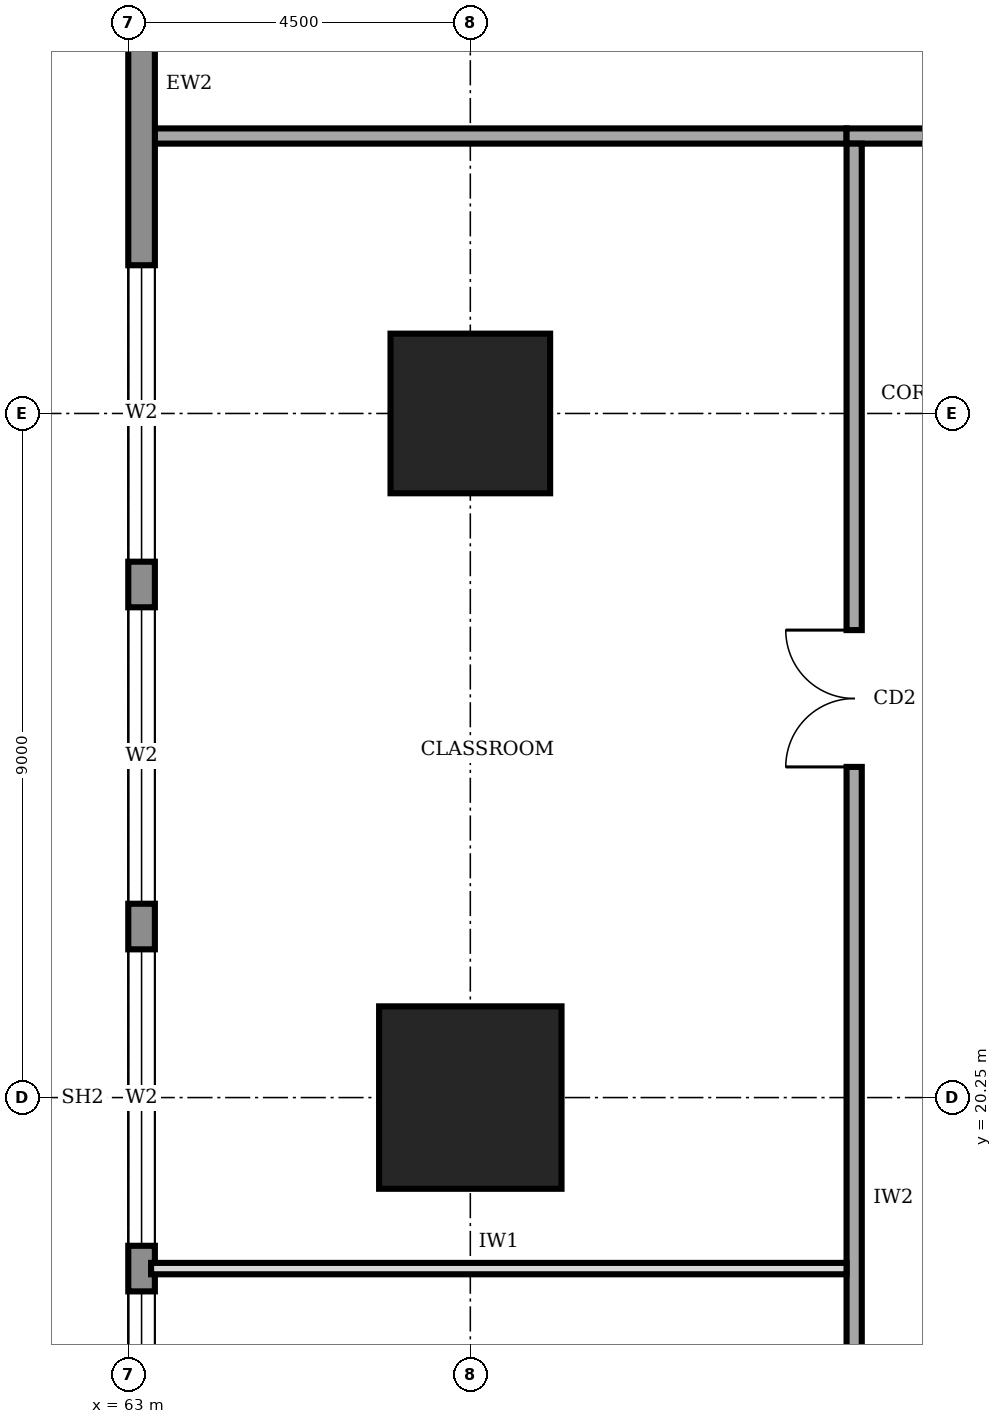
"""IFC4 building model, lengths in metres.
Left out: names, types, materials, properties, quantities, classifications, styles, units other than length and angle.
Written with IfcOpenShell. Run it as: python <this file> out.ifc"""

import sys

from ifc_helpers import new_model, si_unit, direction, frame, frame_2d, origin, origin_2d, place, context, subcontext, project, spatial, rectangle, extrude, element, fill, save


model = new_model("IFC4")
c1 = context("Model", 3, precision=1e-05, world=origin(), true_north=direction((0.0, 1.0)))
c2 = subcontext(c1, "Body", "Model", "MODEL_VIEW")
j1 = project(units=[si_unit("LENGTHUNIT", "METRE"), si_unit("PLANEANGLEUNIT", "RADIAN")], contexts=[c1])
p1 = place(None, origin())
s1 = spatial("IfcSite", under=j1, at=p1, CompositionType="ELEMENT")
p2 = place(p1, origin())
s2 = spatial("IfcBuilding", under=s1, at=p2, CompositionType="ELEMENT")
p3 = place(p2, frame((0.0, 0.0, 65.0)))
s3 = spatial("IfcBuildingStorey", under=s2, at=p3, CompositionType="ELEMENT", Elevation=65.0)
p4 = place(p3, frame((67.5, 20.25, 0.0), z_axis=(0.0, 0.0, 1.0), x_axis=(1.0, 0.0, 0.0)))
e1 = element("IfcColumn", 1, at=p4, inside=s3, PredefinedType="COLUMN", context=c2, shape_type="SweptSolid", body=[
    extrude(rectangle(XDim=2.4, YDim=2.4, at=origin_2d()), origin(), (0.0, 0.0, 1.0), 4.0),
])
p5 = place(p3, frame((67.5, 29.25, 0.0), z_axis=(0.0, 0.0, 1.0), x_axis=(1.0, 0.0, 0.0)))
e2 = element("IfcColumn", 2, at=p5, inside=s3, PredefinedType="COLUMN", context=c2, shape_type="SweptSolid", body=[
    extrude(rectangle(XDim=2.1, YDim=2.1, at=origin_2d()), origin(), (0.0, 0.0, 1.0), 4.0),
])
p6 = place(p3, frame((63.175, 35.98, 0.0), z_axis=(0.0, 0.0, 1.0), x_axis=(0.0, -1.0, 0.0)))
e3 = element("IfcWall", 3, at=p6, inside=s3, PredefinedType="STANDARD", context=c2, shape_type="SweptSolid", body=[
    extrude(rectangle(XDim=31.46, YDim=0.35, at=frame_2d((15.73, 0.0))), origin(), (0.0, 0.0, 1.0), 3.75),
])
p7 = place(p6, frame((27.21, 0.0, 0.6)))
e4 = element("IfcOpeningElement", 4, at=p7, cuts=e3, PredefinedType="OPENING", context=c2, shape_type="SweptSolid", body=[
    extrude(rectangle(XDim=3.9, YDim=2.6, at=frame_2d((1.95, 1.3))), frame((0.0, 0.185, 0.0), z_axis=(0.0, -1.0, 0.0), x_axis=(1.0, 0.0, 0.0)), (0.0, 0.0, 1.0), 0.37),
])
p8 = place(p6, frame((22.78, 0.0, 0.6)))
e5 = element("IfcOpeningElement", 5, at=p8, cuts=e3, PredefinedType="OPENING", context=c2, shape_type="SweptSolid", body=[
    extrude(rectangle(XDim=3.9, YDim=2.6, at=frame_2d((1.95, 1.3))), frame((0.0, 0.185, 0.0), z_axis=(0.0, -1.0, 0.0), x_axis=(1.0, 0.0, 0.0)), (0.0, 0.0, 1.0), 0.37),
])
p9 = place(p6, frame((18.28, 0.0, 0.6)))
e6 = element("IfcOpeningElement", 6, at=p9, cuts=e3, PredefinedType="OPENING", context=c2, shape_type="SweptSolid", body=[
    extrude(rectangle(XDim=3.9, YDim=2.6, at=frame_2d((1.95, 1.3))), frame((0.0, 0.185, 0.0), z_axis=(0.0, -1.0, 0.0), x_axis=(1.0, 0.0, 0.0)), (0.0, 0.0, 1.0), 0.37),
])
p10 = place(p6, frame((13.78, 0.0, 0.6)))
e7 = element("IfcOpeningElement", 7, at=p10, cuts=e3, PredefinedType="OPENING", context=c2, shape_type="SweptSolid", body=[
    extrude(rectangle(XDim=3.9, YDim=2.6, at=frame_2d((1.95, 1.3))), frame((0.0, 0.185, 0.0), z_axis=(0.0, -1.0, 0.0), x_axis=(1.0, 0.0, 0.0)), (0.0, 0.0, 1.0), 0.37),
])
p11 = place(p6, frame((9.28, 0.0, 0.6)))
e8 = element("IfcOpeningElement", 8, at=p11, cuts=e3, PredefinedType="OPENING", context=c2, shape_type="SweptSolid", body=[
    extrude(rectangle(XDim=3.9, YDim=2.6, at=frame_2d((1.95, 1.3))), frame((0.0, 0.185, 0.0), z_axis=(0.0, -1.0, 0.0), x_axis=(1.0, 0.0, 0.0)), (0.0, 0.0, 1.0), 0.37),
])
p12 = place(p6, frame((4.78, 0.0, 0.6)))
e9 = element("IfcOpeningElement", 9, at=p12, cuts=e3, PredefinedType="OPENING", context=c2, shape_type="SweptSolid", body=[
    extrude(rectangle(XDim=3.9, YDim=2.6, at=frame_2d((1.95, 1.3))), frame((0.0, 0.185, 0.0), z_axis=(0.0, -1.0, 0.0), x_axis=(1.0, 0.0, 0.0)), (0.0, 0.0, 1.0), 0.37),
])
p13 = place(p3, frame((89.35, 32.9, 0.0), z_axis=(0.0, 0.0, 1.0), x_axis=(-1.0, 0.0, 0.0)))
e10 = element("IfcWall", 10, at=p13, inside=s3, PredefinedType="SOLIDWALL", context=c2, shape_type="SweptSolid", body=[
    extrude(rectangle(XDim=16.9, YDim=0.2, at=frame_2d((8.45, 0.0))), origin(), (0.0, 0.0, 1.0), 3.75),
])
p14 = place(p13, frame((14.375, 0.0, 0.0)))
e11 = element("IfcOpeningElement", 11, at=p14, cuts=e10, PredefinedType="OPENING", context=c2, shape_type="SweptSolid", body=[
    extrude(rectangle(XDim=1.0, YDim=2.1, at=frame_2d((0.5, 1.05))), frame((0.0, 0.11, 0.0), z_axis=(0.0, -1.0, 0.0), x_axis=(1.0, 0.0, 0.0)), (0.0, 0.0, 1.0), 0.22),
])
p15 = place(p13, frame((7.85, 0.0, 0.0)))
e12 = element("IfcOpeningElement", 12, at=p15, cuts=e10, PredefinedType="OPENING", context=c2, shape_type="SweptSolid", body=[
    extrude(rectangle(XDim=1.0, YDim=2.1, at=frame_2d((0.5, 1.05))), frame((0.0, 0.11, 0.0), z_axis=(0.0, -1.0, 0.0), x_axis=(1.0, 0.0, 0.0)), (0.0, 0.0, 1.0), 0.22),
])
p16 = place(p13, frame((1.325, 0.0, 0.0)))
e13 = element("IfcOpeningElement", 13, at=p16, cuts=e10, PredefinedType="OPENING", context=c2, shape_type="SweptSolid", body=[
    extrude(rectangle(XDim=1.0, YDim=2.1, at=frame_2d((0.5, 1.05))), frame((0.0, 0.11, 0.0), z_axis=(0.0, -1.0, 0.0), x_axis=(1.0, 0.0, 0.0)), (0.0, 0.0, 1.0), 0.22),
])
p17 = place(p3, frame((72.55, 32.8, 0.0), z_axis=(0.0, 0.0, 1.0), x_axis=(0.0, -1.0, 0.0)))
e14 = element("IfcWall", 14, at=p17, inside=s3, PredefinedType="SOLIDWALL", context=c2, shape_type="SweptSolid", body=[
    extrude(rectangle(XDim=25.3, YDim=0.2, at=frame_2d((12.65, 0.0))), origin(), (0.0, 0.0, 1.0), 3.75),
])
p18 = place(p17, frame((19.55, 0.0, 0.0)))
e15 = element("IfcOpeningElement", 15, at=p18, cuts=e14, PredefinedType="OPENING", context=c2, shape_type="SweptSolid", body=[
    extrude(rectangle(XDim=1.0, YDim=2.1, at=frame_2d((0.5, 1.05))), frame((0.0, 0.11, 0.0), z_axis=(0.0, -1.0, 0.0), x_axis=(1.0, 0.0, 0.0)), (0.0, 0.0, 1.0), 0.22),
])
p19 = place(p17, frame((6.4, 0.0, 0.0)))
e16 = element("IfcOpeningElement", 16, at=p19, cuts=e14, PredefinedType="OPENING", context=c2, shape_type="SweptSolid", body=[
    extrude(rectangle(XDim=1.8, YDim=2.1, at=frame_2d((0.9, 1.05))), frame((0.0, 0.11, 0.0), z_axis=(0.0, -1.0, 0.0), x_axis=(1.0, 0.0, 0.0)), (0.0, 0.0, 1.0), 0.22),
])
p20 = place(p3, frame((63.3, 32.9, 0.0), z_axis=(0.0, 0.0, 1.0), x_axis=(1.0, 0.0, 0.0)))
e17 = element("IfcWall", 17, at=p20, inside=s3, PredefinedType="SOLIDWALL", context=c2, shape_type="SweptSolid", body=[
    extrude(rectangle(XDim=9.15, YDim=0.2, at=frame_2d((4.575, 0.0))), origin(), (0.0, 0.0, 1.0), 3.75),
])
p21 = place(p3, frame((63.3, 18.0, 0.0), z_axis=(0.0, 0.0, 1.0), x_axis=(1.0, 0.0, 0.0)))
e18 = element("IfcWall", 18, at=p21, inside=s3, PredefinedType="PARTITIONING", context=c2, shape_type="SweptSolid", body=[
    extrude(rectangle(XDim=9.15, YDim=0.15, at=frame_2d((4.575, 0.0))), origin(), (0.0, 0.0, 1.0), 3.75),
])
p22 = place(p9, origin())
e19 = element("IfcWindow", 19, at=p22, inside=s3, PartitioningType="SINGLE_PANEL", PredefinedType="WINDOW", context=c2, shape_type="SweptSolid", body=[
    extrude(rectangle(XDim=3.9, YDim=2.6, at=frame_2d((1.95, 1.3))), frame((0.0, 0.03, 0.0), z_axis=(0.0, -1.0, 0.0), x_axis=(1.0, 0.0, 0.0)), (0.0, 0.0, 1.0), 0.06),
])
fill(e6, e19)
p23 = place(p10, origin())
e20 = element("IfcWindow", 20, at=p23, inside=s3, PartitioningType="SINGLE_PANEL", PredefinedType="WINDOW", context=c2, shape_type="SweptSolid", body=[
    extrude(rectangle(XDim=3.9, YDim=2.6, at=frame_2d((1.95, 1.3))), frame((0.0, 0.03, 0.0), z_axis=(0.0, -1.0, 0.0), x_axis=(1.0, 0.0, 0.0)), (0.0, 0.0, 1.0), 0.06),
])
fill(e7, e20)
p24 = place(p11, origin())
e21 = element("IfcWindow", 21, at=p24, inside=s3, PartitioningType="SINGLE_PANEL", PredefinedType="WINDOW", context=c2, shape_type="SweptSolid", body=[
    extrude(rectangle(XDim=3.9, YDim=2.6, at=frame_2d((1.95, 1.3))), frame((0.0, 0.03, 0.0), z_axis=(0.0, -1.0, 0.0), x_axis=(1.0, 0.0, 0.0)), (0.0, 0.0, 1.0), 0.06),
])
fill(e8, e21)
p25 = place(p12, origin())
e22 = element("IfcWindow", 22, at=p25, inside=s3, PartitioningType="SINGLE_PANEL", PredefinedType="WINDOW", context=c2, shape_type="SweptSolid", body=[
    extrude(rectangle(XDim=3.9, YDim=2.6, at=frame_2d((1.95, 1.3))), frame((0.0, 0.03, 0.0), z_axis=(0.0, -1.0, 0.0), x_axis=(1.0, 0.0, 0.0)), (0.0, 0.0, 1.0), 0.06),
])
fill(e9, e22)
p26 = place(p19, frame((1.8, 0.0, 0.0), z_axis=(0.0, 0.0, 1.0), x_axis=(-1.0, 0.0, 0.0)))
e23 = element("IfcDoor", 23, at=p26, inside=s3, OperationType="DOUBLE_DOOR_SINGLE_SWING", PredefinedType="DOOR", context=c2, shape_type="SweptSolid", body=[
    extrude(rectangle(XDim=1.8, YDim=2.1, at=frame_2d((0.9, 1.05))), frame((0.0, 0.025, 0.0), z_axis=(0.0, -1.0, 0.0), x_axis=(1.0, 0.0, 0.0)), (0.0, 0.0, 1.0), 0.05),
])
fill(e16, e23)
save(model, sys.argv[1])
